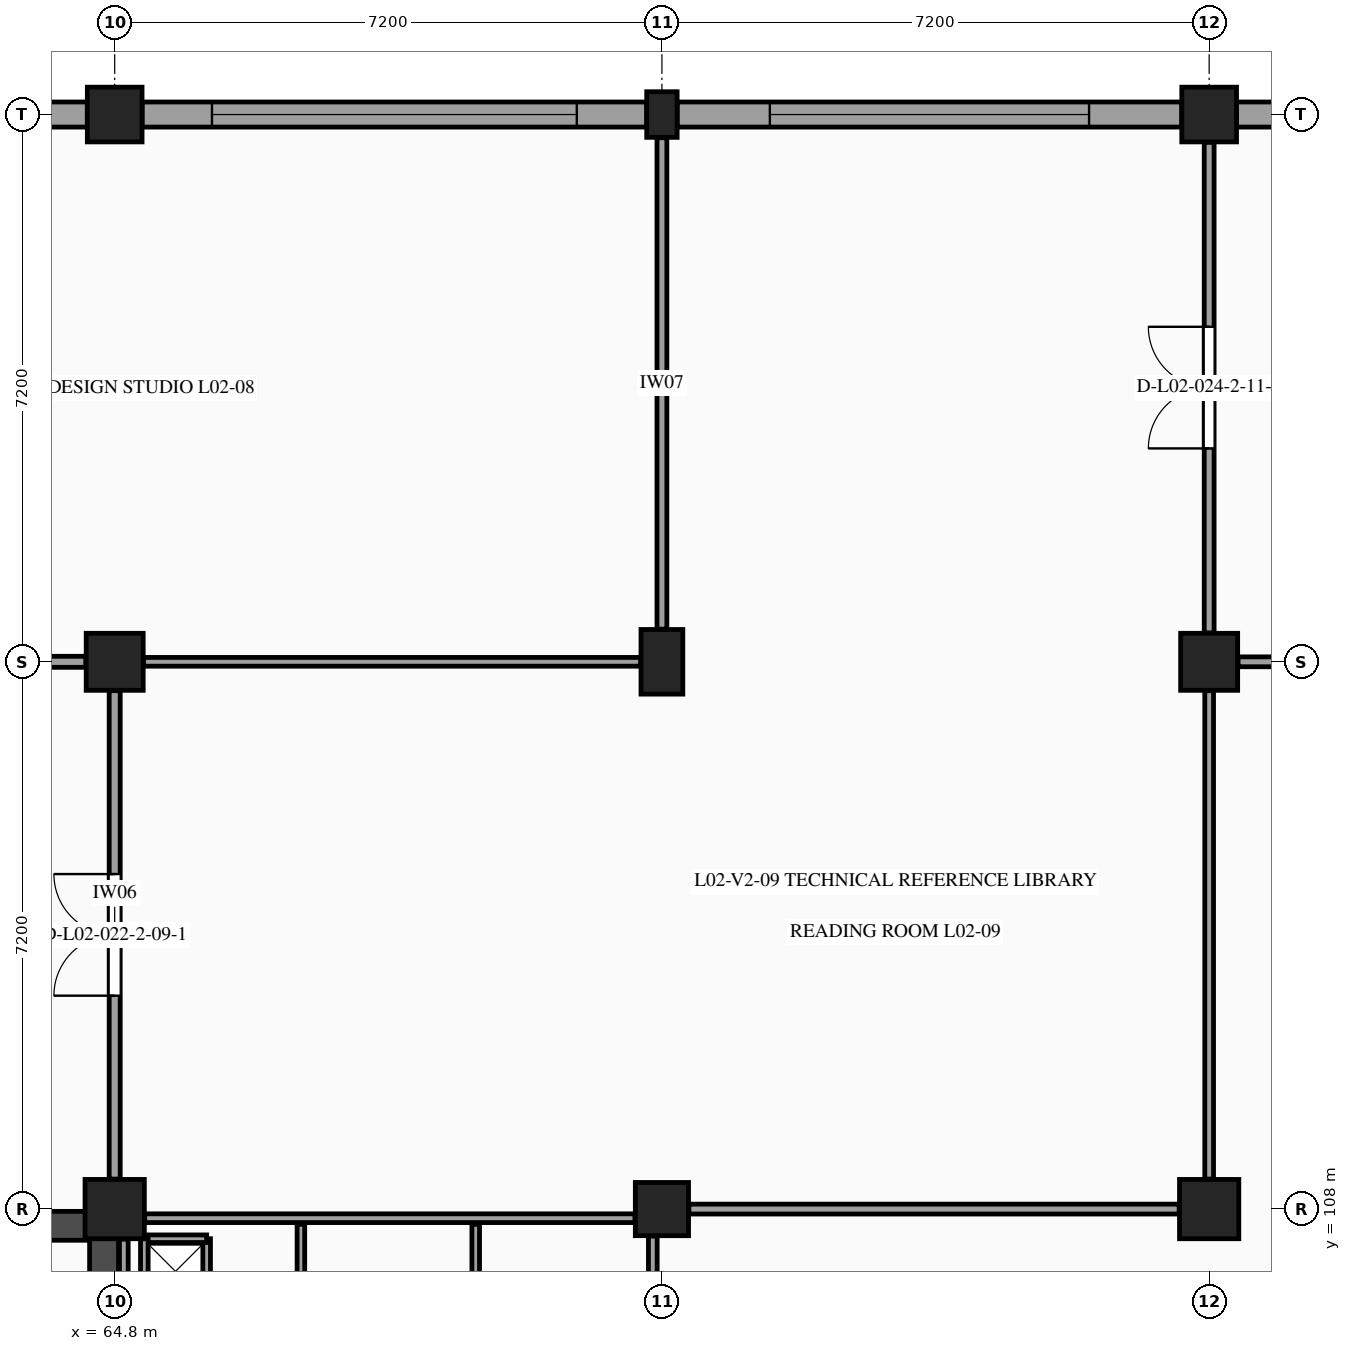
"""IFC4 building model, lengths in metres.
Left out: names, types, materials, properties, quantities, classifications, styles, units other than length and angle.
Written with IfcOpenShell. Run it as: python <this file> out.ifc"""

import sys

from ifc_helpers import new_model, si_unit, direction, frame, frame_2d, origin, origin_2d, place, context, subcontext, project, spatial, rectangle, extrude, element, fill, save


model = new_model("IFC4")
c1 = context("Model", 3, precision=1e-05, world=origin(), true_north=direction((0.0, 1.0)))
c2 = subcontext(c1, "Body", "Model", "MODEL_VIEW")
j1 = project(units=[si_unit("LENGTHUNIT", "METRE"), si_unit("PLANEANGLEUNIT", "RADIAN")], contexts=[c1])
p1 = place(None, origin())
s1 = spatial("IfcSite", under=j1, at=p1, CompositionType="ELEMENT")
p2 = place(p1, origin())
s2 = spatial("IfcBuilding", under=s1, at=p2, CompositionType="ELEMENT")
p3 = place(p2, frame((0.0, 0.0, 9.9)))
s3 = spatial("IfcBuildingStorey", under=s2, at=p3, CompositionType="ELEMENT", Elevation=9.9)
p4 = place(p3, frame((64.8, 108.0, 0.0), z_axis=(0.0, 0.0, 1.0), x_axis=(1.0, 0.0, 0.0)))
e1 = element("IfcColumn", 1, at=p4, inside=s3, PredefinedType="COLUMN", context=c2, shape_type="SweptSolid", body=[
    extrude(rectangle(XDim=0.78, YDim=0.78, at=origin_2d()), origin(), (0.0, 0.0, 1.0), 4.5),
])
p5 = place(p3, frame((64.8, 115.2, 0.0), z_axis=(0.0, 0.0, 1.0), x_axis=(1.0, 0.0, 0.0)))
e2 = element("IfcColumn", 2, at=p5, inside=s3, PredefinedType="COLUMN", context=c2, shape_type="SweptSolid", body=[
    extrude(rectangle(XDim=0.75, YDim=0.75, at=origin_2d()), origin(), (0.0, 0.0, 1.0), 4.5),
])
p6 = place(p3, frame((64.8, 122.4, 0.0), z_axis=(0.0, 0.0, 1.0), x_axis=(1.0, 0.0, 0.0)))
e3 = element("IfcColumn", 3, at=p6, inside=s3, PredefinedType="COLUMN", context=c2, shape_type="SweptSolid", body=[
    extrude(rectangle(XDim=0.72, YDim=0.72, at=origin_2d()), origin(), (0.0, 0.0, 1.0), 4.5),
])
p7 = place(p3, frame((72.0, 108.0, 0.0), z_axis=(0.0, 0.0, 1.0), x_axis=(1.0, 0.0, 0.0)))
e4 = element("IfcColumn", 4, at=p7, inside=s3, PredefinedType="COLUMN", context=c2, shape_type="SweptSolid", body=[
    extrude(rectangle(XDim=0.7, YDim=0.7, at=origin_2d()), origin(), (0.0, 0.0, 1.0), 4.5),
])
p8 = place(p3, frame((72.0, 115.2, 0.0), z_axis=(0.0, 0.0, 1.0), x_axis=(1.0, 0.0, 0.0)))
e5 = element("IfcColumn", 5, at=p8, inside=s3, PredefinedType="COLUMN", context=c2, shape_type="SweptSolid", body=[
    extrude(rectangle(XDim=0.55, YDim=0.85, at=origin_2d()), origin(), (0.0, 0.0, 1.0), 4.5),
])
p9 = place(p3, frame((72.0, 122.4, 0.0), z_axis=(0.0, 0.0, 1.0), x_axis=(1.0, 0.0, 0.0)))
e6 = element("IfcColumn", 6, at=p9, inside=s3, PredefinedType="PILASTER", context=c2, shape_type="SweptSolid", body=[
    extrude(rectangle(XDim=0.4, YDim=0.6, at=origin_2d()), origin(), (0.0, 0.0, 1.0), 4.5),
])
p10 = place(p3, frame((79.2, 108.0, 0.0), z_axis=(0.0, 0.0, 1.0), x_axis=(1.0, 0.0, 0.0)))
e7 = element("IfcColumn", 7, at=p10, inside=s3, PredefinedType="COLUMN", context=c2, shape_type="SweptSolid", body=[
    extrude(rectangle(XDim=0.78, YDim=0.78, at=origin_2d()), origin(), (0.0, 0.0, 1.0), 4.5),
])
p11 = place(p3, frame((79.2, 115.2, 0.0), z_axis=(0.0, 0.0, 1.0), x_axis=(1.0, 0.0, 0.0)))
e8 = element("IfcColumn", 8, at=p11, inside=s3, PredefinedType="COLUMN", context=c2, shape_type="SweptSolid", body=[
    extrude(rectangle(XDim=0.75, YDim=0.75, at=origin_2d()), origin(), (0.0, 0.0, 1.0), 4.5),
])
p12 = place(p3, frame((79.2, 122.4, 0.0), z_axis=(0.0, 0.0, 1.0), x_axis=(1.0, 0.0, 0.0)))
e9 = element("IfcColumn", 9, at=p12, inside=s3, PredefinedType="COLUMN", context=c2, shape_type="SweptSolid", body=[
    extrude(rectangle(XDim=0.72, YDim=0.72, at=origin_2d()), origin(), (0.0, 0.0, 1.0), 4.5),
])
p13 = place(p3, frame((57.8, 122.4, 0.0), z_axis=(0.0, 0.0, 1.0), x_axis=(1.0, 0.0, 0.0)))
e10 = element("IfcWall", 10, at=p13, inside=s3, PredefinedType="STANDARD", context=c2, shape_type="SweptSolid", body=[
    extrude(rectangle(XDim=6.64, YDim=0.33, at=frame_2d((3.32, 0.0))), origin(), (0.0, 0.0, 1.0), 3.47),
])
p14 = place(p13, frame((2.27, 0.0, 0.98)))
e11 = element("IfcOpeningElement", 11, at=p14, cuts=e10, PredefinedType="OPENING", context=c2, shape_type="SweptSolid", body=[
    extrude(rectangle(XDim=2.1, YDim=1.3, at=frame_2d((1.05, 0.65))), frame((0.0, 0.175, 0.0), z_axis=(0.0, -1.0, 0.0), x_axis=(1.0, 0.0, 0.0)), (0.0, 0.0, 1.0), 0.35),
])
p15 = place(p3, frame((65.16, 122.4, 0.0), z_axis=(0.0, 0.0, 1.0), x_axis=(1.0, 0.0, 0.0)))
e12 = element("IfcWall", 12, at=p15, inside=s3, PredefinedType="STANDARD", context=c2, shape_type="SweptSolid", body=[
    extrude(rectangle(XDim=6.64, YDim=0.33, at=frame_2d((3.32, 0.0))), origin(), (0.0, 0.0, 1.0), 3.47),
])
p16 = place(p15, frame((0.92, 0.0, 0.98)))
e13 = element("IfcOpeningElement", 13, at=p16, cuts=e12, PredefinedType="OPENING", context=c2, shape_type="SweptSolid", body=[
    extrude(rectangle(XDim=4.8, YDim=1.5, at=frame_2d((2.4, 0.75))), frame((0.0, 0.175, 0.0), z_axis=(0.0, -1.0, 0.0), x_axis=(1.0, 0.0, 0.0)), (0.0, 0.0, 1.0), 0.35),
])
p17 = place(p3, frame((72.2, 122.4, 0.0), z_axis=(0.0, 0.0, 1.0), x_axis=(1.0, 0.0, 0.0)))
e14 = element("IfcWall", 14, at=p17, inside=s3, PredefinedType="STANDARD", context=c2, shape_type="SweptSolid", body=[
    extrude(rectangle(XDim=6.64, YDim=0.33, at=frame_2d((3.32, 0.0))), origin(), (0.0, 0.0, 1.0), 3.47),
])
p18 = place(p17, frame((1.22, 0.0, 0.98)))
e15 = element("IfcOpeningElement", 15, at=p18, cuts=e14, PredefinedType="OPENING", context=c2, shape_type="SweptSolid", body=[
    extrude(rectangle(XDim=4.2, YDim=1.5, at=frame_2d((2.1, 0.75))), frame((0.0, 0.175, 0.0), z_axis=(0.0, -1.0, 0.0), x_axis=(1.0, 0.0, 0.0)), (0.0, 0.0, 1.0), 0.35),
])
p19 = place(p3, frame((79.56, 122.4, 0.0), z_axis=(0.0, 0.0, 1.0), x_axis=(1.0, 0.0, 0.0)))
e16 = element("IfcWall", 16, at=p19, inside=s3, PredefinedType="STANDARD", context=c2, shape_type="SweptSolid", body=[
    extrude(rectangle(XDim=6.64, YDim=0.33, at=frame_2d((3.32, 0.0))), origin(), (0.0, 0.0, 1.0), 3.47),
])
p20 = place(p19, frame((1.52, 0.0, 0.98)))
e17 = element("IfcOpeningElement", 17, at=p20, cuts=e16, PredefinedType="OPENING", context=c2, shape_type="SweptSolid", body=[
    extrude(rectangle(XDim=3.6, YDim=1.5, at=frame_2d((1.8, 0.75))), frame((0.0, 0.175, 0.0), z_axis=(0.0, -1.0, 0.0), x_axis=(1.0, 0.0, 0.0)), (0.0, 0.0, 1.0), 0.35),
])
p21 = place(p3, frame((58.01, 107.78, 0.0), z_axis=(0.0, 0.0, 1.0), x_axis=(1.0, 0.0, 0.0)))
e18 = element("IfcWall", 18, at=p21, inside=s3, PredefinedType="SHEAR", context=c2, shape_type="SweptSolid", body=[
    extrude(rectangle(XDim=6.46, YDim=0.38, at=frame_2d((3.23, 0.0))), origin(), (0.0, 0.0, 1.0), 4.225),
])
p22 = place(p21, frame((1.42, 0.0, 0.0)))
e19 = element("IfcOpeningElement", 19, at=p22, cuts=e18, PredefinedType="OPENING", context=c2, shape_type="SweptSolid", body=[
    extrude(rectangle(XDim=0.85, YDim=2.1, at=frame_2d((0.425, 1.05))), frame((0.0, 0.2, 0.0), z_axis=(0.0, -1.0, 0.0), x_axis=(1.0, 0.0, 0.0)), (0.0, 0.0, 1.0), 0.4),
])
p23 = place(p21, frame((3.2, 0.0, 0.0)))
e20 = element("IfcOpeningElement", 20, at=p23, cuts=e18, PredefinedType="OPENING", context=c2, shape_type="SweptSolid", body=[
    extrude(rectangle(XDim=1.6, YDim=2.2, at=frame_2d((0.8, 1.1))), frame((0.0, 0.2, 0.0), z_axis=(0.0, -1.0, 0.0), x_axis=(1.0, 0.0, 0.0)), (0.0, 0.0, 1.0), 0.4),
])
p24 = place(p3, frame((64.66, 100.83, 0.0), z_axis=(0.0, 0.0, 1.0), x_axis=(0.0, 1.0, 0.0)))
e21 = element("IfcWall", 21, at=p24, inside=s3, PredefinedType="SHEAR", context=c2, shape_type="SweptSolid", body=[
    extrude(rectangle(XDim=7.14, YDim=0.38, at=frame_2d((3.57, 0.0))), origin(), (0.0, 0.0, 1.0), 4.225),
])
p25 = place(p3, frame((65.195, 107.88, 0.0), z_axis=(0.0, 0.0, 1.0), x_axis=(1.0, 0.0, 0.0)))
e22 = element("IfcWall", 22, at=p25, inside=s3, PredefinedType="PARTITIONING", context=c2, shape_type="SweptSolid", body=[
    extrude(rectangle(XDim=6.45, YDim=0.115, at=frame_2d((3.225, 0.0))), origin(), (0.0, 0.0, 1.0), 3.475),
])
p26 = place(p3, frame((64.92, 101.105, 0.0), z_axis=(0.0, 0.0, 1.0), x_axis=(0.0, 1.0, 0.0)))
e23 = element("IfcWall", 23, at=p26, inside=s3, PredefinedType="PARTITIONING", context=c2, shape_type="SweptSolid", body=[
    extrude(rectangle(XDim=6.5, YDim=0.115, at=frame_2d((3.25, 0.0))), origin(), (0.0, 0.0, 1.0), 3.54),
])
p27 = place(p3, frame((71.88, 101.165, 0.0), z_axis=(0.0, 0.0, 1.0), x_axis=(0.0, 1.0, 0.0)))
e24 = element("IfcWall", 24, at=p27, inside=s3, PredefinedType="PARTITIONING", context=c2, shape_type="SweptSolid", body=[
    extrude(rectangle(XDim=6.48, YDim=0.115, at=frame_2d((3.24, 0.0))), origin(), (0.0, 0.0, 1.0), 3.54),
])
for number, where, z_axis, x_axis in (
    (25, (67.25, 101.0, 0.0), (0.0, 0.0, 1.0), (0.0, 1.0, 0.0)),
    (26, (69.55, 101.0, 0.0), (0.0, 0.0, 1.0), (0.0, 1.0, 0.0)),
):
    element("IfcWall", number, at=place(p3, frame(where, z_axis=z_axis, x_axis=x_axis)), inside=s3, PredefinedType="PARTITIONING", context=c2, shape_type="SweptSolid", body=[
        extrude(rectangle(XDim=6.8, YDim=0.1, at=frame_2d((3.4, 0.0))), origin(), (0.0, 0.0, 1.0), 4.225),
    ])
p28 = place(p3, frame((66.01, 106.75, 0.0), z_axis=(0.0, 0.0, 1.0), x_axis=(0.0, 1.0, 0.0)))
e27 = element("IfcWall", 27, at=p28, inside=s3, PredefinedType="PARTITIONING", context=c2, shape_type="SweptSolid", body=[
    extrude(rectangle(XDim=0.86, YDim=0.1, at=frame_2d((0.43, 0.0))), origin(), (0.0, 0.0, 1.0), 4.225),
])
p29 = place(p3, frame((66.01, 107.61, 0.0), z_axis=(0.0, 0.0, 1.0), x_axis=(-1.0, 0.0, 0.0)))
e28 = element("IfcWall", 28, at=p29, inside=s3, PredefinedType="PARTITIONING", context=c2, shape_type="SweptSolid", body=[
    extrude(rectangle(XDim=0.82, YDim=0.1, at=frame_2d((0.41, 0.0))), origin(), (0.0, 0.0, 1.0), 4.225),
])
p30 = place(p3, frame((65.19, 107.61, 0.0), z_axis=(0.0, 0.0, 1.0), x_axis=(0.0, -1.0, 0.0)))
e29 = element("IfcWall", 29, at=p30, inside=s3, PredefinedType="PARTITIONING", context=c2, shape_type="SweptSolid", body=[
    extrude(rectangle(XDim=0.86, YDim=0.1, at=frame_2d((0.43, 0.0))), origin(), (0.0, 0.0, 1.0), 4.225),
])
p31 = place(p3, frame((64.8, 108.395, 0.0), z_axis=(0.0, 0.0, 1.0), x_axis=(0.0, 1.0, 0.0)))
e30 = element("IfcWall", 30, at=p31, inside=s3, PredefinedType="PARTITIONING", context=c2, shape_type="SweptSolid", body=[
    extrude(rectangle(XDim=6.425, YDim=0.145, at=frame_2d((3.212, 0.0))), origin(), (0.0, 0.0, 1.0), 3.535),
])
p32 = place(p31, frame((2.413, 0.0, 0.0)))
e31 = element("IfcOpeningElement", 31, at=p32, cuts=e30, PredefinedType="OPENING", context=c2, shape_type="SweptSolid", body=[
    extrude(rectangle(XDim=1.6, YDim=2.2, at=frame_2d((0.8, 1.1))), frame((0.0, 0.083, 0.0), z_axis=(0.0, -1.0, 0.0), x_axis=(1.0, 0.0, 0.0)), (0.0, 0.0, 1.0), 0.165),
])
p33 = place(p3, frame((57.88, 115.2, 0.0), z_axis=(0.0, 0.0, 1.0), x_axis=(1.0, 0.0, 0.0)))
e32 = element("IfcWall", 32, at=p33, inside=s3, PredefinedType="PARTITIONING", context=c2, shape_type="SweptSolid", body=[
    extrude(rectangle(XDim=6.54, YDim=0.145, at=frame_2d((3.27, 0.0))), origin(), (0.0, 0.0, 1.0), 3.445),
])
p34 = place(p3, frame((65.18, 115.2, 0.0), z_axis=(0.0, 0.0, 1.0), x_axis=(1.0, 0.0, 0.0)))
e33 = element("IfcWall", 33, at=p34, inside=s3, PredefinedType="PARTITIONING", context=c2, shape_type="SweptSolid", body=[
    extrude(rectangle(XDim=6.54, YDim=0.115, at=frame_2d((3.27, 0.0))), origin(), (0.0, 0.0, 1.0), 3.475),
])
p35 = place(p3, frame((72.0, 115.63, 0.0), z_axis=(0.0, 0.0, 1.0), x_axis=(0.0, 1.0, 0.0)))
e34 = element("IfcWall", 34, at=p35, inside=s3, PredefinedType="PARTITIONING", context=c2, shape_type="SweptSolid", body=[
    extrude(rectangle(XDim=6.465, YDim=0.13, at=frame_2d((3.232, 0.0))), origin(), (0.0, 0.0, 1.0), 3.53),
])
p36 = place(p3, frame((72.355, 108.0, 0.0), z_axis=(0.0, 0.0, 1.0), x_axis=(1.0, 0.0, 0.0)))
e35 = element("IfcWall", 35, at=p36, inside=s3, PredefinedType="PARTITIONING", context=c2, shape_type="SweptSolid", body=[
    extrude(rectangle(XDim=6.45, YDim=0.13, at=frame_2d((3.225, 0.0))), origin(), (0.0, 0.0, 1.0), 3.485),
])
p37 = place(p3, frame((79.2, 108.395, 0.0), z_axis=(0.0, 0.0, 1.0), x_axis=(0.0, 1.0, 0.0)))
e36 = element("IfcWall", 36, at=p37, inside=s3, PredefinedType="PARTITIONING", context=c2, shape_type="SweptSolid", body=[
    extrude(rectangle(XDim=6.425, YDim=0.115, at=frame_2d((3.212, 0.0))), origin(), (0.0, 0.0, 1.0), 3.535),
])
p38 = place(p3, frame((79.2, 115.58, 0.0), z_axis=(0.0, 0.0, 1.0), x_axis=(0.0, 1.0, 0.0)))
e37 = element("IfcWall", 37, at=p38, inside=s3, PredefinedType="PARTITIONING", context=c2, shape_type="SweptSolid", body=[
    extrude(rectangle(XDim=6.455, YDim=0.13, at=frame_2d((3.228, 0.0))), origin(), (0.0, 0.0, 1.0), 3.53),
])
p39 = place(p38, frame((2.427, 0.0, 0.0)))
e38 = element("IfcOpeningElement", 38, at=p39, cuts=e37, PredefinedType="OPENING", context=c2, shape_type="SweptSolid", body=[
    extrude(rectangle(XDim=1.6, YDim=2.2, at=frame_2d((0.8, 1.1))), frame((0.0, 0.075, 0.0), z_axis=(0.0, -1.0, 0.0), x_axis=(1.0, 0.0, 0.0)), (0.0, 0.0, 1.0), 0.15),
])
p40 = place(p3, frame((79.58, 115.2, 0.0), z_axis=(0.0, 0.0, 1.0), x_axis=(1.0, 0.0, 0.0)))
e39 = element("IfcWall", 39, at=p40, inside=s3, PredefinedType="PARTITIONING", context=c2, shape_type="SweptSolid", body=[
    extrude(rectangle(XDim=6.54, YDim=0.13, at=frame_2d((3.27, 0.0))), origin(), (0.0, 0.0, 1.0), 3.5),
])
p41 = place(p16, origin())
e40 = element("IfcWindow", 40, at=p41, inside=s3, PartitioningType="SINGLE_PANEL", PredefinedType="WINDOW", context=c2, shape_type="SweptSolid", body=[
    extrude(rectangle(XDim=4.8, YDim=1.5, at=frame_2d((2.4, 0.75))), frame((0.0, -0.03, 0.0), z_axis=(0.0, -1.0, 0.0), x_axis=(1.0, 0.0, 0.0)), (0.0, 0.0, 1.0), 0.06),
])
fill(e13, e40)
p42 = place(p18, origin())
e41 = element("IfcWindow", 41, at=p42, inside=s3, PartitioningType="SINGLE_PANEL", PredefinedType="WINDOW", context=c2, shape_type="SweptSolid", body=[
    extrude(rectangle(XDim=4.2, YDim=1.5, at=frame_2d((2.1, 0.75))), frame((0.0, -0.03, 0.0), z_axis=(0.0, -1.0, 0.0), x_axis=(1.0, 0.0, 0.0)), (0.0, 0.0, 1.0), 0.06),
])
fill(e15, e41)
p43 = place(p32, origin())
e42 = element("IfcDoor", 42, at=p43, inside=s3, OperationType="DOUBLE_DOOR_SINGLE_SWING", PredefinedType="DOOR", context=c2, shape_type="SweptSolid", body=[
    extrude(rectangle(XDim=1.6, YDim=2.2, at=frame_2d((0.8, 1.1))), frame((0.0, 0.025, 0.0), z_axis=(0.0, -1.0, 0.0), x_axis=(1.0, 0.0, 0.0)), (0.0, 0.0, 1.0), 0.05),
])
fill(e31, e42)
p44 = place(p39, origin())
e43 = element("IfcDoor", 43, at=p44, inside=s3, OperationType="DOUBLE_DOOR_SINGLE_SWING", PredefinedType="DOOR", context=c2, shape_type="SweptSolid", body=[
    extrude(rectangle(XDim=1.6, YDim=2.2, at=frame_2d((0.8, 1.1))), frame((0.0, 0.025, 0.0), z_axis=(0.0, -1.0, 0.0), x_axis=(1.0, 0.0, 0.0)), (0.0, 0.0, 1.0), 0.05),
])
fill(e38, e43)
save(model, sys.argv[1])
